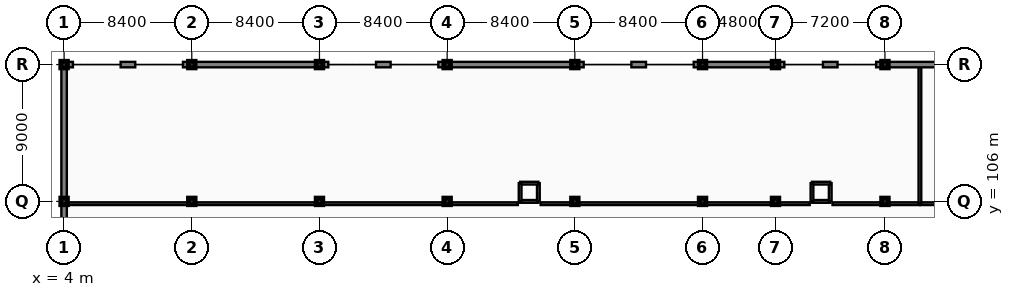
"""IFC4 building model, lengths in metres.
Left out: names, types, materials, properties, quantities, classifications, styles, units other than length and angle.
Written with IfcOpenShell. Run it as: python <this file> out.ifc"""

import sys

from ifc_helpers import new_model, si_unit, direction, frame, frame_2d, origin, origin_2d, place, context, subcontext, project, spatial, rectangle, extrude, element, fill, save


model = new_model("IFC4")
c1 = context("Model", 3, precision=1e-05, world=origin(), true_north=direction((0.0, 1.0)))
c2 = subcontext(c1, "Body", "Model", "MODEL_VIEW")
j1 = project(units=[si_unit("LENGTHUNIT", "METRE"), si_unit("PLANEANGLEUNIT", "RADIAN")], contexts=[c1])
p1 = place(None, origin())
s1 = spatial("IfcSite", under=j1, at=p1, CompositionType="ELEMENT")
p2 = place(p1, origin())
s2 = spatial("IfcBuilding", under=s1, at=p2, CompositionType="ELEMENT")
p3 = place(p2, frame((0.0, 0.0, 5.4)))
s3 = spatial("IfcBuildingStorey", under=s2, at=p3, CompositionType="ELEMENT", Elevation=5.4)
for number, where, z_axis, x_axis in (
    (1, (4.0, 106.0, 0.0), (0.0, 0.0, 1.0), (1.0, 0.0, 0.0)),
    (2, (4.0, 115.0, 0.0), (0.0, 0.0, 1.0), (1.0, 0.0, 0.0)),
    (3, (12.4, 106.0, 0.0), (0.0, 0.0, 1.0), (1.0, 0.0, 0.0)),
    (4, (12.4, 115.0, 0.0), (0.0, 0.0, 1.0), (1.0, 0.0, 0.0)),
    (5, (20.8, 106.0, 0.0), (0.0, 0.0, 1.0), (1.0, 0.0, 0.0)),
    (6, (20.8, 115.0, 0.0), (0.0, 0.0, 1.0), (1.0, 0.0, 0.0)),
    (7, (29.2, 106.0, 0.0), (0.0, 0.0, 1.0), (1.0, 0.0, 0.0)),
    (8, (29.2, 115.0, 0.0), (0.0, 0.0, 1.0), (1.0, 0.0, 0.0)),
    (9, (37.6, 106.0, 0.0), (0.0, 0.0, 1.0), (1.0, 0.0, 0.0)),
    (10, (37.6, 115.0, 0.0), (0.0, 0.0, 1.0), (1.0, 0.0, 0.0)),
    (11, (46.0, 106.0, 0.0), (0.0, 0.0, 1.0), (1.0, 0.0, 0.0)),
    (12, (46.0, 115.0, 0.0), (0.0, 0.0, 1.0), (1.0, 0.0, 0.0)),
    (13, (50.8, 106.0, 0.0), (0.0, 0.0, 1.0), (1.0, 0.0, 0.0)),
    (14, (50.8, 115.0, 0.0), (0.0, 0.0, 1.0), (1.0, 0.0, 0.0)),
    (15, (58.0, 106.0, 0.0), (0.0, 0.0, 1.0), (1.0, 0.0, 0.0)),
    (16, (58.0, 115.0, 0.0), (0.0, 0.0, 1.0), (1.0, 0.0, 0.0)),
):
    element("IfcColumn", number, at=place(p3, frame(where, z_axis=z_axis, x_axis=x_axis)), inside=s3, PredefinedType="COLUMN", context=c2, shape_type="SweptSolid", body=[
        extrude(rectangle(XDim=0.44, YDim=0.44, at=origin_2d()), origin(), (0.0, 0.0, 1.0), 4.2),
    ])
p4 = place(p3, frame((4.14, 105.85, 0.0), z_axis=(0.0, 0.0, 1.0), x_axis=(1.0, 0.0, 0.0)))
e17 = element("IfcWall", 17, at=p4, inside=s3, PredefinedType="PARTITIONING", context=c2, shape_type="SweptSolid", body=[
    extrude(rectangle(XDim=29.71, YDim=0.18, at=frame_2d((14.855, 0.0))), origin(), (0.0, 0.0, 1.0), 3.25),
])
p5 = place(p4, frame((12.649, 0.0, -0.01)))
e18 = element("IfcOpeningElement", 18, at=p5, cuts=e17, PredefinedType="OPENING", context=c2, shape_type="SweptSolid", body=[
    extrude(rectangle(XDim=1.6, YDim=2.21, at=frame_2d((0.8, 1.105))), frame((0.0, 0.1, 0.0), z_axis=(0.0, -1.0, 0.0), x_axis=(1.0, 0.0, 0.0)), (0.0, 0.0, 1.0), 0.2),
])
p6 = place(p3, frame((35.35, 105.85, 0.0), z_axis=(0.0, 0.0, 1.0), x_axis=(1.0, 0.0, 0.0)))
e19 = element("IfcWall", 19, at=p6, inside=s3, PredefinedType="PARTITIONING", context=c2, shape_type="SweptSolid", body=[
    extrude(rectangle(XDim=17.7, YDim=0.18, at=frame_2d((8.85, 0.0))), origin(), (0.0, 0.0, 1.0), 3.25),
])
p7 = place(p3, frame((54.55, 105.85, 0.0), z_axis=(0.0, 0.0, 1.0), x_axis=(1.0, 0.0, 0.0)))
e20 = element("IfcWall", 20, at=p7, inside=s3, PredefinedType="PARTITIONING", context=c2, shape_type="SweptSolid", body=[
    extrude(rectangle(XDim=5.75, YDim=0.18, at=frame_2d((2.875, 0.0))), origin(), (0.0, 0.0, 1.0), 3.25),
])
p8 = place(p3, frame((60.3, 105.85, 0.0), z_axis=(0.0, 0.0, 1.0), x_axis=(1.0, 0.0, 0.0)))
e21 = element("IfcWall", 21, at=p8, inside=s3, PredefinedType="PARTITIONING", context=c2, shape_type="SweptSolid", body=[
    extrude(rectangle(XDim=15.1, YDim=0.18, at=frame_2d((7.55, 0.0))), origin(), (0.0, 0.0, 1.0), 3.25),
])
p9 = place(p8, frame((7.05, 0.0, -0.01)))
e22 = element("IfcOpeningElement", 22, at=p9, cuts=e21, PredefinedType="OPENING", context=c2, shape_type="SweptSolid", body=[
    extrude(rectangle(XDim=1.0, YDim=2.16, at=frame_2d((0.5, 1.08))), frame((0.0, 0.1, 0.0), z_axis=(0.0, -1.0, 0.0), x_axis=(1.0, 0.0, 0.0)), (0.0, 0.0, 1.0), 0.2),
])
p10 = place(p3, frame((60.3, 105.85, 0.0), z_axis=(0.0, 0.0, 1.0), x_axis=(0.0, 1.0, 0.0)))
e23 = element("IfcWall", 23, at=p10, inside=s3, PredefinedType="PARTITIONING", context=c2, shape_type="SweptSolid", body=[
    extrude(rectangle(XDim=9.01, YDim=0.18, at=frame_2d((4.505, 0.0))), origin(), (0.0, 0.0, 1.0), 3.25),
])
p11 = place(p3, frame((8.68, 115.0, 0.0), z_axis=(0.0, 0.0, 1.0), x_axis=(-1.0, 0.0, 0.0)))
e24 = element("IfcWall", 24, at=p11, inside=s3, PredefinedType="SOLIDWALL", context=c2, shape_type="SweptSolid", body=[
    extrude(rectangle(XDim=0.96, YDim=0.36, at=frame_2d((0.48, 0.0))), origin(), (0.0, 0.0, 1.0), 3.31),
])
p12 = place(p3, frame((12.27, 115.0, 0.0), z_axis=(0.0, 0.0, 1.0), x_axis=(-1.0, 0.0, 0.0)))
e25 = element("IfcWall", 25, at=p12, inside=s3, PredefinedType="SOLIDWALL", context=c2, shape_type="SweptSolid", body=[
    extrude(rectangle(XDim=0.45, YDim=0.36, at=frame_2d((0.225, 0.0))), origin(), (0.0, 0.0, 1.0), 3.31),
])
p13 = place(p3, frame((4.58, 115.0, 0.0), z_axis=(0.0, 0.0, 1.0), x_axis=(-1.0, 0.0, 0.0)))
e26 = element("IfcWall", 26, at=p13, inside=s3, PredefinedType="SOLIDWALL", context=c2, shape_type="SweptSolid", body=[
    extrude(rectangle(XDim=0.45, YDim=0.36, at=frame_2d((0.225, 0.0))), origin(), (0.0, 0.0, 1.0), 3.31),
])
p14 = place(p3, frame((20.8, 115.0, 0.0), z_axis=(0.0, 0.0, 1.0), x_axis=(-1.0, 0.0, 0.0)))
e27 = element("IfcWall", 27, at=p14, inside=s3, PredefinedType="SOLIDWALL", context=c2, shape_type="SweptSolid", body=[
    extrude(rectangle(XDim=8.4, YDim=0.36, at=frame_2d((4.2, 0.0))), origin(), (0.0, 0.0, 1.0), 3.31),
])
p15 = place(p14, frame((0.46, 0.0, 0.75)))
e28 = element("IfcOpeningElement", 28, at=p15, cuts=e27, PredefinedType="OPENING", context=c2, shape_type="SweptSolid", body=[
    extrude(rectangle(XDim=1.55, YDim=2.42, at=frame_2d((0.775, 1.21))), frame((0.0, 0.19, 0.0), z_axis=(0.0, -1.0, 0.0), x_axis=(1.0, 0.0, 0.0)), (0.0, 0.0, 1.0), 0.38),
])
p16 = place(p14, frame((6.26, 0.0, 0.75)))
e29 = element("IfcOpeningElement", 29, at=p16, cuts=e27, PredefinedType="OPENING", context=c2, shape_type="SweptSolid", body=[
    extrude(rectangle(XDim=1.55, YDim=2.42, at=frame_2d((0.775, 1.21))), frame((0.0, 0.19, 0.0), z_axis=(0.0, -1.0, 0.0), x_axis=(1.0, 0.0, 0.0)), (0.0, 0.0, 1.0), 0.38),
])
p17 = place(p3, frame((25.48, 115.0, 0.0), z_axis=(0.0, 0.0, 1.0), x_axis=(-1.0, 0.0, 0.0)))
e30 = element("IfcWall", 30, at=p17, inside=s3, PredefinedType="SOLIDWALL", context=c2, shape_type="SweptSolid", body=[
    extrude(rectangle(XDim=0.96, YDim=0.36, at=frame_2d((0.48, 0.0))), origin(), (0.0, 0.0, 1.0), 3.37),
])
for number, where, z_axis, x_axis in (
    (31, (29.07, 115.0, 0.0), (0.0, 0.0, 1.0), (-1.0, 0.0, 0.0)),
    (32, (21.38, 115.0, 0.0), (0.0, 0.0, 1.0), (-1.0, 0.0, 0.0)),
):
    element("IfcWall", number, at=place(p3, frame(where, z_axis=z_axis, x_axis=x_axis)), inside=s3, PredefinedType="SOLIDWALL", context=c2, shape_type="SweptSolid", body=[
        extrude(rectangle(XDim=0.45, YDim=0.36, at=frame_2d((0.225, 0.0))), origin(), (0.0, 0.0, 1.0), 3.37),
    ])
p18 = place(p3, frame((37.6, 115.0, 0.0), z_axis=(0.0, 0.0, 1.0), x_axis=(-1.0, 0.0, 0.0)))
e33 = element("IfcWall", 33, at=p18, inside=s3, PredefinedType="SOLIDWALL", context=c2, shape_type="SweptSolid", body=[
    extrude(rectangle(XDim=8.4, YDim=0.36, at=frame_2d((4.2, 0.0))), origin(), (0.0, 0.0, 1.0), 3.37),
])
p19 = place(p18, frame((0.46, 0.0, 0.75)))
e34 = element("IfcOpeningElement", 34, at=p19, cuts=e33, PredefinedType="OPENING", context=c2, shape_type="SweptSolid", body=[
    extrude(rectangle(XDim=1.55, YDim=2.45, at=frame_2d((0.775, 1.225))), frame((0.0, 0.19, 0.0), z_axis=(0.0, -1.0, 0.0), x_axis=(1.0, 0.0, 0.0)), (0.0, 0.0, 1.0), 0.38),
])
p20 = place(p18, frame((6.26, 0.0, 0.75)))
e35 = element("IfcOpeningElement", 35, at=p20, cuts=e33, PredefinedType="OPENING", context=c2, shape_type="SweptSolid", body=[
    extrude(rectangle(XDim=1.55, YDim=2.45, at=frame_2d((0.775, 1.225))), frame((0.0, 0.19, 0.0), z_axis=(0.0, -1.0, 0.0), x_axis=(1.0, 0.0, 0.0)), (0.0, 0.0, 1.0), 0.38),
])
p21 = place(p3, frame((42.28, 115.0, 0.0), z_axis=(0.0, 0.0, 1.0), x_axis=(-1.0, 0.0, 0.0)))
e36 = element("IfcWall", 36, at=p21, inside=s3, PredefinedType="SOLIDWALL", context=c2, shape_type="SweptSolid", body=[
    extrude(rectangle(XDim=0.96, YDim=0.36, at=frame_2d((0.48, 0.0))), origin(), (0.0, 0.0, 1.0), 3.37),
])
p22 = place(p3, frame((45.87, 115.0, 0.0), z_axis=(0.0, 0.0, 1.0), x_axis=(-1.0, 0.0, 0.0)))
e37 = element("IfcWall", 37, at=p22, inside=s3, PredefinedType="SOLIDWALL", context=c2, shape_type="SweptSolid", body=[
    extrude(rectangle(XDim=0.45, YDim=0.36, at=frame_2d((0.225, 0.0))), origin(), (0.0, 0.0, 1.0), 3.37),
])
p23 = place(p3, frame((38.18, 115.0, 0.0), z_axis=(0.0, 0.0, 1.0), x_axis=(-1.0, 0.0, 0.0)))
e38 = element("IfcWall", 38, at=p23, inside=s3, PredefinedType="SOLIDWALL", context=c2, shape_type="SweptSolid", body=[
    extrude(rectangle(XDim=0.45, YDim=0.36, at=frame_2d((0.225, 0.0))), origin(), (0.0, 0.0, 1.0), 3.37),
])
p24 = place(p3, frame((50.8, 115.0, 0.0), z_axis=(0.0, 0.0, 1.0), x_axis=(-1.0, 0.0, 0.0)))
e39 = element("IfcWall", 39, at=p24, inside=s3, PredefinedType="SOLIDWALL", context=c2, shape_type="SweptSolid", body=[
    extrude(rectangle(XDim=4.8, YDim=0.36, at=frame_2d((2.4, 0.0))), origin(), (0.0, 0.0, 1.0), 3.37),
])
p25 = place(p24, frame((0.46, 0.0, 0.75)))
e40 = element("IfcOpeningElement", 40, at=p25, cuts=e39, PredefinedType="OPENING", context=c2, shape_type="SweptSolid", body=[
    extrude(rectangle(XDim=1.55, YDim=2.45, at=frame_2d((0.775, 1.225))), frame((0.0, 0.19, 0.0), z_axis=(0.0, -1.0, 0.0), x_axis=(1.0, 0.0, 0.0)), (0.0, 0.0, 1.0), 0.38),
])
p26 = place(p24, frame((2.66, 0.0, 0.75)))
e41 = element("IfcOpeningElement", 41, at=p26, cuts=e39, PredefinedType="OPENING", context=c2, shape_type="SweptSolid", body=[
    extrude(rectangle(XDim=1.55, YDim=2.45, at=frame_2d((0.775, 1.225))), frame((0.0, 0.19, 0.0), z_axis=(0.0, -1.0, 0.0), x_axis=(1.0, 0.0, 0.0)), (0.0, 0.0, 1.0), 0.38),
])
p27 = place(p3, frame((54.88, 115.0, 0.0), z_axis=(0.0, 0.0, 1.0), x_axis=(-1.0, 0.0, 0.0)))
e42 = element("IfcWall", 42, at=p27, inside=s3, PredefinedType="SOLIDWALL", context=c2, shape_type="SweptSolid", body=[
    extrude(rectangle(XDim=0.96, YDim=0.36, at=frame_2d((0.48, 0.0))), origin(), (0.0, 0.0, 1.0), 3.37),
])
p28 = place(p3, frame((57.87, 115.0, 0.0), z_axis=(0.0, 0.0, 1.0), x_axis=(-1.0, 0.0, 0.0)))
e43 = element("IfcWall", 43, at=p28, inside=s3, PredefinedType="SOLIDWALL", context=c2, shape_type="SweptSolid", body=[
    extrude(rectangle(XDim=0.45, YDim=0.36, at=frame_2d((0.225, 0.0))), origin(), (0.0, 0.0, 1.0), 3.37),
])
p29 = place(p3, frame((51.38, 115.0, 0.0), z_axis=(0.0, 0.0, 1.0), x_axis=(-1.0, 0.0, 0.0)))
e44 = element("IfcWall", 44, at=p29, inside=s3, PredefinedType="SOLIDWALL", context=c2, shape_type="SweptSolid", body=[
    extrude(rectangle(XDim=0.45, YDim=0.36, at=frame_2d((0.225, 0.0))), origin(), (0.0, 0.0, 1.0), 3.37),
])
p30 = place(p3, frame((65.2, 115.0, 0.0), z_axis=(0.0, 0.0, 1.0), x_axis=(-1.0, 0.0, 0.0)))
e45 = element("IfcWall", 45, at=p30, inside=s3, PredefinedType="SOLIDWALL", context=c2, shape_type="SweptSolid", body=[
    extrude(rectangle(XDim=7.2, YDim=0.36, at=frame_2d((3.6, 0.0))), origin(), (0.0, 0.0, 1.0), 3.37),
])
p31 = place(p30, frame((0.46, 0.0, 0.75)))
e46 = element("IfcOpeningElement", 46, at=p31, cuts=e45, PredefinedType="OPENING", context=c2, shape_type="SweptSolid", body=[
    extrude(rectangle(XDim=1.55, YDim=2.45, at=frame_2d((0.775, 1.225))), frame((0.0, 0.19, 0.0), z_axis=(0.0, -1.0, 0.0), x_axis=(1.0, 0.0, 0.0)), (0.0, 0.0, 1.0), 0.38),
])
p32 = place(p30, frame((3.06, 0.0, 0.75)))
e47 = element("IfcOpeningElement", 47, at=p32, cuts=e45, PredefinedType="OPENING", context=c2, shape_type="SweptSolid", body=[
    extrude(rectangle(XDim=1.55, YDim=2.45, at=frame_2d((0.775, 1.225))), frame((0.0, 0.19, 0.0), z_axis=(0.0, -1.0, 0.0), x_axis=(1.0, 0.0, 0.0)), (0.0, 0.0, 1.0), 0.38),
])
p33 = place(p3, frame((4.0, 106.0, 0.0), z_axis=(0.0, 0.0, 1.0), x_axis=(0.0, -1.0, 0.0)))
e48 = element("IfcWall", 48, at=p33, inside=s3, PredefinedType="SOLIDWALL", context=c2, shape_type="SweptSolid", body=[
    extrude(rectangle(XDim=8.4, YDim=0.36, at=frame_2d((4.2, 0.0))), origin(), (0.0, 0.0, 1.0), 3.31),
])
p34 = place(p33, frame((0.46, 0.0, 0.75)))
e49 = element("IfcOpeningElement", 49, at=p34, cuts=e48, PredefinedType="OPENING", context=c2, shape_type="SweptSolid", body=[
    extrude(rectangle(XDim=1.55, YDim=2.42, at=frame_2d((0.775, 1.21))), frame((0.0, 0.19, 0.0), z_axis=(0.0, -1.0, 0.0), x_axis=(1.0, 0.0, 0.0)), (0.0, 0.0, 1.0), 0.38),
])
p35 = place(p33, frame((6.26, 0.0, 0.75)))
e50 = element("IfcOpeningElement", 50, at=p35, cuts=e48, PredefinedType="OPENING", context=c2, shape_type="SweptSolid", body=[
    extrude(rectangle(XDim=1.55, YDim=2.42, at=frame_2d((0.775, 1.21))), frame((0.0, 0.19, 0.0), z_axis=(0.0, -1.0, 0.0), x_axis=(1.0, 0.0, 0.0)), (0.0, 0.0, 1.0), 0.38),
])
p36 = place(p3, frame((4.0, 115.0, 0.0), z_axis=(0.0, 0.0, 1.0), x_axis=(0.0, -1.0, 0.0)))
e51 = element("IfcWall", 51, at=p36, inside=s3, PredefinedType="SOLIDWALL", context=c2, shape_type="SweptSolid", body=[
    extrude(rectangle(XDim=9.0, YDim=0.36, at=frame_2d((4.5, 0.0))), origin(), (0.0, 0.0, 1.0), 3.31),
])
p37 = place(p36, frame((0.46, 0.0, 0.75)))
e52 = element("IfcOpeningElement", 52, at=p37, cuts=e51, PredefinedType="OPENING", context=c2, shape_type="SweptSolid", body=[
    extrude(rectangle(XDim=1.55, YDim=2.42, at=frame_2d((0.775, 1.21))), frame((0.0, 0.19, 0.0), z_axis=(0.0, -1.0, 0.0), x_axis=(1.0, 0.0, 0.0)), (0.0, 0.0, 1.0), 0.38),
])
p38 = place(p36, frame((6.86, 0.0, 0.75)))
e53 = element("IfcOpeningElement", 53, at=p38, cuts=e51, PredefinedType="OPENING", context=c2, shape_type="SweptSolid", body=[
    extrude(rectangle(XDim=1.55, YDim=2.42, at=frame_2d((0.775, 1.21))), frame((0.0, 0.19, 0.0), z_axis=(0.0, -1.0, 0.0), x_axis=(1.0, 0.0, 0.0)), (0.0, 0.0, 1.0), 0.38),
])
p39 = place(p3, frame((34.0, 106.0, 0.0), z_axis=(0.0, 0.0, 1.0), x_axis=(1.0, 0.0, 0.0)))
e54 = element("IfcWall", 54, at=p39, inside=s3, PredefinedType="SOLIDWALL", context=c2, shape_type="SweptSolid", body=[
    extrude(rectangle(XDim=1.2, YDim=0.18, at=frame_2d((0.6, 0.0))), origin(), (0.0, 0.0, 1.0), 3.97),
])
p40 = place(p39, frame((0.2, 0.0, -0.01)))
e55 = element("IfcOpeningElement", 55, at=p40, cuts=e54, PredefinedType="OPENING", context=c2, shape_type="SweptSolid", body=[
    extrude(rectangle(XDim=0.8, YDim=2.06, at=frame_2d((0.4, 1.03))), frame((0.0, 0.1, 0.0), z_axis=(0.0, -1.0, 0.0), x_axis=(1.0, 0.0, 0.0)), (0.0, 0.0, 1.0), 0.2),
])
for number, where, z_axis, x_axis in (
    (56, (35.2, 106.0, 0.0), (0.0, 0.0, 1.0), (0.0, 1.0, 0.0)),
    (57, (35.2, 107.2, 0.0), (0.0, 0.0, 1.0), (-1.0, 0.0, 0.0)),
    (58, (34.0, 107.2, 0.0), (0.0, 0.0, 1.0), (0.0, -1.0, 0.0)),
):
    element("IfcWall", number, at=place(p3, frame(where, z_axis=z_axis, x_axis=x_axis)), inside=s3, PredefinedType="SOLIDWALL", context=c2, shape_type="SweptSolid", body=[
        extrude(rectangle(XDim=1.2, YDim=0.18, at=frame_2d((0.6, 0.0))), origin(), (0.0, 0.0, 1.0), 3.97),
    ])
p41 = place(p3, frame((53.2, 106.0, 0.0), z_axis=(0.0, 0.0, 1.0), x_axis=(1.0, 0.0, 0.0)))
e59 = element("IfcWall", 59, at=p41, inside=s3, PredefinedType="SOLIDWALL", context=c2, shape_type="SweptSolid", body=[
    extrude(rectangle(XDim=1.2, YDim=0.18, at=frame_2d((0.6, 0.0))), origin(), (0.0, 0.0, 1.0), 3.97),
])
p42 = place(p41, frame((0.2, 0.0, -0.01)))
e60 = element("IfcOpeningElement", 60, at=p42, cuts=e59, PredefinedType="OPENING", context=c2, shape_type="SweptSolid", body=[
    extrude(rectangle(XDim=0.8, YDim=2.06, at=frame_2d((0.4, 1.03))), frame((0.0, 0.1, 0.0), z_axis=(0.0, -1.0, 0.0), x_axis=(1.0, 0.0, 0.0)), (0.0, 0.0, 1.0), 0.2),
])
for number, where, z_axis, x_axis in (
    (61, (54.4, 106.0, 0.0), (0.0, 0.0, 1.0), (0.0, 1.0, 0.0)),
    (62, (54.4, 107.2, 0.0), (0.0, 0.0, 1.0), (-1.0, 0.0, 0.0)),
    (63, (53.2, 107.2, 0.0), (0.0, 0.0, 1.0), (0.0, -1.0, 0.0)),
):
    element("IfcWall", number, at=place(p3, frame(where, z_axis=z_axis, x_axis=x_axis)), inside=s3, PredefinedType="SOLIDWALL", context=c2, shape_type="SweptSolid", body=[
        extrude(rectangle(XDim=1.2, YDim=0.18, at=frame_2d((0.6, 0.0))), origin(), (0.0, 0.0, 1.0), 3.97),
    ])
p43 = place(p5, frame((0.0, 0.0, 0.01)))
e64 = element("IfcDoor", 64, at=p43, inside=s3, OperationType="DOUBLE_SWING_LEFT", PredefinedType="DOOR", context=c2, shape_type="SweptSolid", body=[
    extrude(rectangle(XDim=1.6, YDim=2.2, at=frame_2d((0.8, 1.1))), frame((0.0, 0.025, 0.0), z_axis=(0.0, -1.0, 0.0), x_axis=(1.0, 0.0, 0.0)), (0.0, 0.0, 1.0), 0.05),
])
fill(e18, e64)
p44 = place(p15, origin())
e65 = element("IfcWindow", 65, at=p44, inside=s3, PartitioningType="DOUBLE_PANEL_HORIZONTAL", PredefinedType="WINDOW", context=c2, shape_type="SweptSolid", body=[
    extrude(rectangle(XDim=1.55, YDim=2.42, at=frame_2d((0.775, 1.21))), frame((0.0, 0.03, 0.0), z_axis=(0.0, -1.0, 0.0), x_axis=(1.0, 0.0, 0.0)), (0.0, 0.0, 1.0), 0.06),
])
fill(e28, e65)
p45 = place(p16, origin())
e66 = element("IfcWindow", 66, at=p45, inside=s3, PartitioningType="DOUBLE_PANEL_HORIZONTAL", PredefinedType="WINDOW", context=c2, shape_type="SweptSolid", body=[
    extrude(rectangle(XDim=1.55, YDim=2.42, at=frame_2d((0.775, 1.21))), frame((0.0, 0.03, 0.0), z_axis=(0.0, -1.0, 0.0), x_axis=(1.0, 0.0, 0.0)), (0.0, 0.0, 1.0), 0.06),
])
fill(e29, e66)
p46 = place(p19, origin())
e67 = element("IfcWindow", 67, at=p46, inside=s3, PartitioningType="DOUBLE_PANEL_HORIZONTAL", PredefinedType="WINDOW", context=c2, shape_type="SweptSolid", body=[
    extrude(rectangle(XDim=1.55, YDim=2.45, at=frame_2d((0.775, 1.225))), frame((0.0, 0.03, 0.0), z_axis=(0.0, -1.0, 0.0), x_axis=(1.0, 0.0, 0.0)), (0.0, 0.0, 1.0), 0.06),
])
fill(e34, e67)
p47 = place(p20, origin())
e68 = element("IfcWindow", 68, at=p47, inside=s3, PartitioningType="DOUBLE_PANEL_HORIZONTAL", PredefinedType="WINDOW", context=c2, shape_type="SweptSolid", body=[
    extrude(rectangle(XDim=1.55, YDim=2.45, at=frame_2d((0.775, 1.225))), frame((0.0, 0.03, 0.0), z_axis=(0.0, -1.0, 0.0), x_axis=(1.0, 0.0, 0.0)), (0.0, 0.0, 1.0), 0.06),
])
fill(e35, e68)
p48 = place(p25, origin())
e69 = element("IfcWindow", 69, at=p48, inside=s3, PartitioningType="DOUBLE_PANEL_HORIZONTAL", PredefinedType="WINDOW", context=c2, shape_type="SweptSolid", body=[
    extrude(rectangle(XDim=1.55, YDim=2.45, at=frame_2d((0.775, 1.225))), frame((0.0, 0.03, 0.0), z_axis=(0.0, -1.0, 0.0), x_axis=(1.0, 0.0, 0.0)), (0.0, 0.0, 1.0), 0.06),
])
fill(e40, e69)
p49 = place(p26, origin())
e70 = element("IfcWindow", 70, at=p49, inside=s3, PartitioningType="DOUBLE_PANEL_HORIZONTAL", PredefinedType="WINDOW", context=c2, shape_type="SweptSolid", body=[
    extrude(rectangle(XDim=1.55, YDim=2.45, at=frame_2d((0.775, 1.225))), frame((0.0, 0.03, 0.0), z_axis=(0.0, -1.0, 0.0), x_axis=(1.0, 0.0, 0.0)), (0.0, 0.0, 1.0), 0.06),
])
fill(e41, e70)
p50 = place(p32, origin())
e71 = element("IfcWindow", 71, at=p50, inside=s3, PartitioningType="DOUBLE_PANEL_HORIZONTAL", PredefinedType="WINDOW", context=c2, shape_type="SweptSolid", body=[
    extrude(rectangle(XDim=1.55, YDim=2.45, at=frame_2d((0.775, 1.225))), frame((0.0, 0.03, 0.0), z_axis=(0.0, -1.0, 0.0), x_axis=(1.0, 0.0, 0.0)), (0.0, 0.0, 1.0), 0.06),
])
fill(e47, e71)
p51 = place(p34, origin())
e72 = element("IfcWindow", 72, at=p51, inside=s3, PartitioningType="DOUBLE_PANEL_HORIZONTAL", PredefinedType="WINDOW", context=c2, shape_type="SweptSolid", body=[
    extrude(rectangle(XDim=1.55, YDim=2.42, at=frame_2d((0.775, 1.21))), frame((0.0, 0.03, 0.0), z_axis=(0.0, -1.0, 0.0), x_axis=(1.0, 0.0, 0.0)), (0.0, 0.0, 1.0), 0.06),
])
fill(e49, e72)
p52 = place(p37, origin())
e73 = element("IfcWindow", 73, at=p52, inside=s3, PartitioningType="DOUBLE_PANEL_HORIZONTAL", PredefinedType="WINDOW", context=c2, shape_type="SweptSolid", body=[
    extrude(rectangle(XDim=1.55, YDim=2.42, at=frame_2d((0.775, 1.21))), frame((0.0, 0.03, 0.0), z_axis=(0.0, -1.0, 0.0), x_axis=(1.0, 0.0, 0.0)), (0.0, 0.0, 1.0), 0.06),
])
fill(e52, e73)
p53 = place(p38, origin())
e74 = element("IfcWindow", 74, at=p53, inside=s3, PartitioningType="DOUBLE_PANEL_HORIZONTAL", PredefinedType="WINDOW", context=c2, shape_type="SweptSolid", body=[
    extrude(rectangle(XDim=1.55, YDim=2.42, at=frame_2d((0.775, 1.21))), frame((0.0, 0.03, 0.0), z_axis=(0.0, -1.0, 0.0), x_axis=(1.0, 0.0, 0.0)), (0.0, 0.0, 1.0), 0.06),
])
fill(e53, e74)
p54 = place(p40, frame((0.0, 0.0, 0.01)))
e75 = element("IfcDoor", 75, at=p54, inside=s3, OperationType="SINGLE_SWING_LEFT", PredefinedType="DOOR", context=c2, shape_type="SweptSolid", body=[
    extrude(rectangle(XDim=0.8, YDim=2.05, at=frame_2d((0.4, 1.025))), frame((0.0, 0.025, 0.0), z_axis=(0.0, -1.0, 0.0), x_axis=(1.0, 0.0, 0.0)), (0.0, 0.0, 1.0), 0.05),
])
fill(e55, e75)
p55 = place(p42, frame((0.0, 0.0, 0.01)))
e76 = element("IfcDoor", 76, at=p55, inside=s3, OperationType="SINGLE_SWING_RIGHT", PredefinedType="DOOR", context=c2, shape_type="SweptSolid", body=[
    extrude(rectangle(XDim=0.8, YDim=2.05, at=frame_2d((0.4, 1.025))), frame((0.0, 0.025, 0.0), z_axis=(0.0, -1.0, 0.0), x_axis=(1.0, 0.0, 0.0)), (0.0, 0.0, 1.0), 0.05),
])
fill(e60, e76)
save(model, sys.argv[1])
